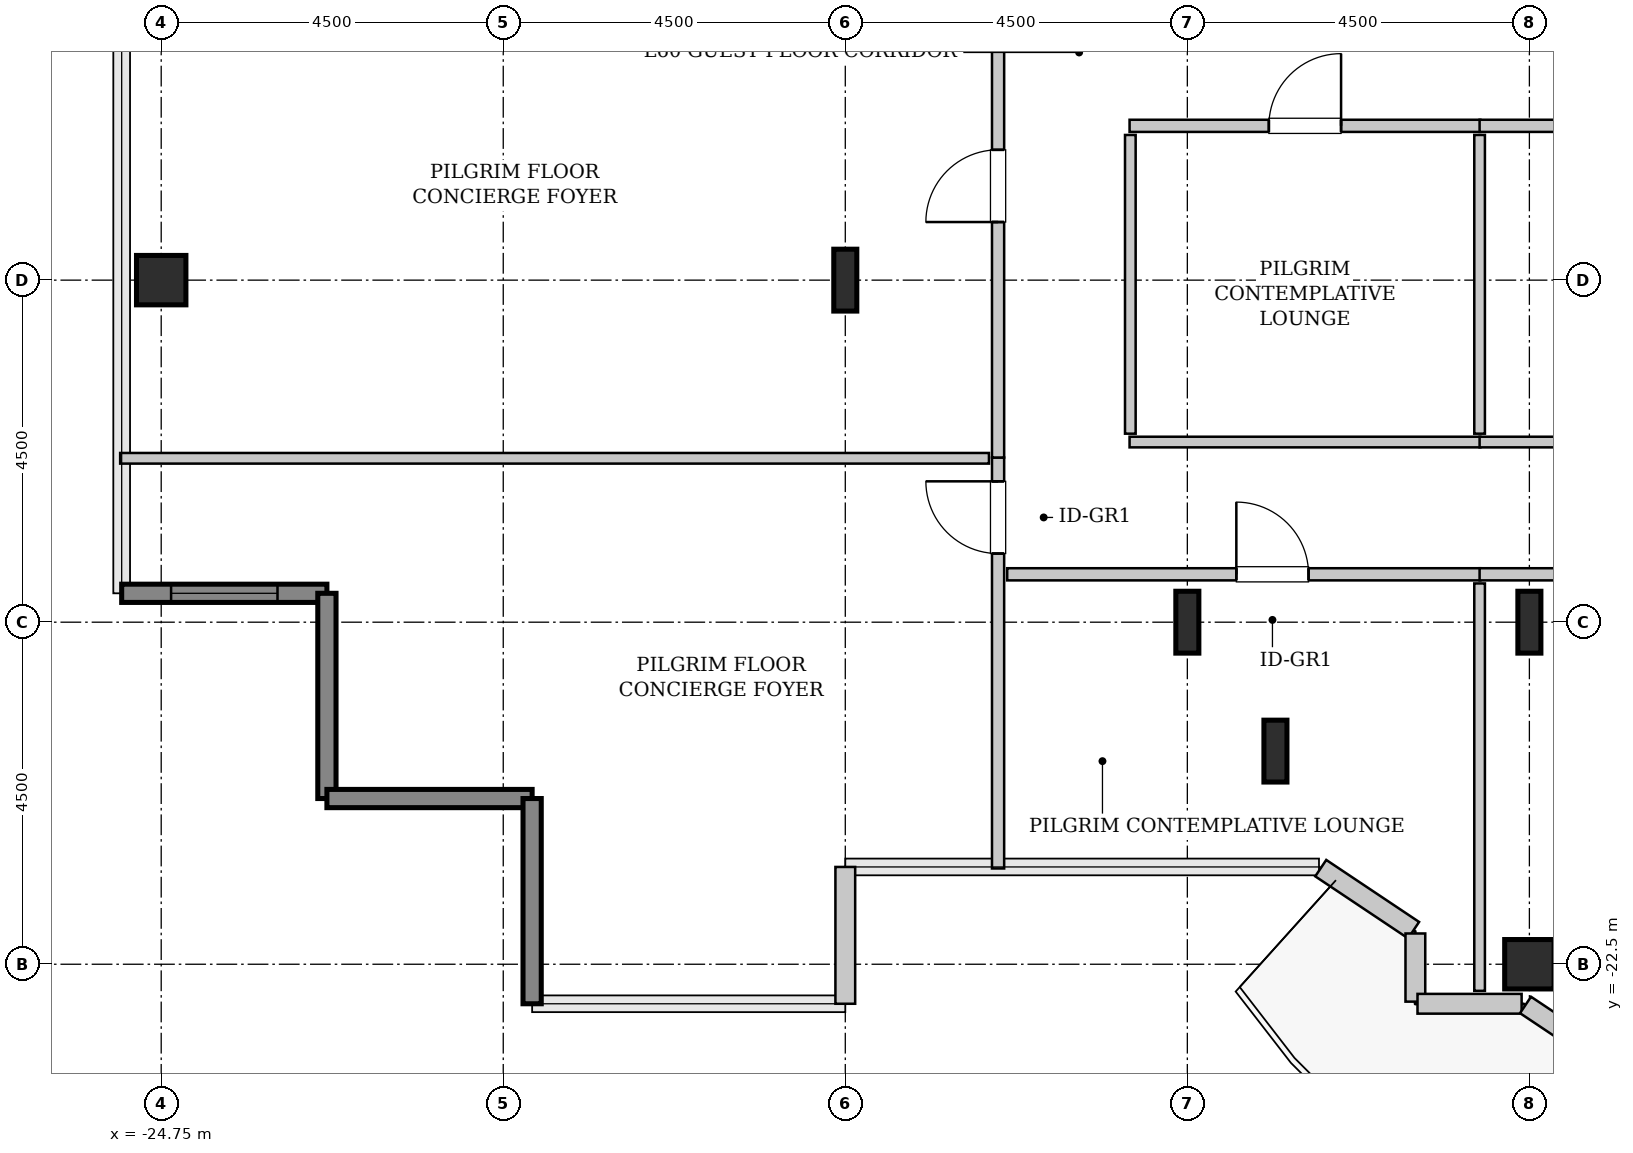
"""IFC4 building model, lengths in metres.
Left out: names, types, materials, properties, quantities, classifications, styles, units other than length and angle.
Written with IfcOpenShell. Run it as: python <this file> out.ifc"""

import sys

from ifc_helpers import new_model, si_unit, direction, frame, frame_2d, origin, origin_2d, place, context, subcontext, project, spatial, rectangle, hollow_rectangle, i_section, extrude, source, transform, mapped, element, fill, save


model = new_model("IFC4")
c1 = context("Model", 3, precision=1e-05, world=origin(), true_north=direction((0.0, 1.0)))
c2 = subcontext(c1, "Body", "Model", "MODEL_VIEW")
j1 = project(units=[si_unit("LENGTHUNIT", "METRE"), si_unit("PLANEANGLEUNIT", "RADIAN")], contexts=[c1])
p1 = place(None, origin())
s1 = spatial("IfcSite", under=j1, at=p1, CompositionType="ELEMENT")
p2 = place(p1, origin())
s2 = spatial("IfcBuilding", under=s1, at=p2, CompositionType="ELEMENT")
p3 = place(p2, frame((0.0, 0.0, 240.8)))
s3 = spatial("IfcBuildingStorey", under=s2, at=p3, CompositionType="ELEMENT", Elevation=240.8)
m1 = source(origin(), c2, "Body", "SweptSolid", [
    extrude(hollow_rectangle(XDim=0.65, YDim=0.65, WallThickness=0.032, InnerFilletRadius=0.032, OuterFilletRadius=0.064, at=origin_2d()), origin(), (0.0, 0.0, 1.0), 3.8),
])
p4 = place(p3, frame((-24.75, -13.5, 0.0), z_axis=(0.0, 0.0, 1.0), x_axis=(1.0, 0.0, 0.0)))
e1 = element("IfcColumn", 1, at=p4, inside=s3, PredefinedType="COLUMN", context=c2, shape_type="MappedRepresentation", body=[
    mapped(m1, transform((0.0, 0.0, 0.0), x_axis=(1.0, 0.0, 0.0), y_axis=(0.0, 1.0, 0.0), z_axis=(0.0, 0.0, 1.0), scale=1.0)),
])
m2 = source(origin(), c2, "Body", "SweptSolid", [
    extrude(i_section(OverallWidth=0.303, OverallDepth=0.814, WebThickness=0.021, FlangeThickness=0.04, FilletRadius=0.03, at=origin_2d()), origin(), (0.0, 0.0, 1.0), 3.8),
])
for number, where, z_axis, x_axis in (
    (2, (-15.75, -13.5, 0.0), (0.0, 0.0, 1.0), (1.0, 0.0, 0.0)),
    (3, (-11.25, -18.0, 0.0), (0.0, 0.0, 1.0), (1.0, 0.0, 0.0)),
    (4, (-10.091, -19.696, 0.0), (0.0, 0.0, 1.0), (1.0, 0.0, 0.0)),
):
    element("IfcColumn", number, at=place(p3, frame(where, z_axis=z_axis, x_axis=x_axis)), inside=s3, PredefinedType="COLUMN", context=c2, shape_type="MappedRepresentation", body=[
        mapped(m2, transform((0.0, 0.0, 0.0), x_axis=(1.0, 0.0, 0.0), y_axis=(0.0, 1.0, 0.0), z_axis=(0.0, 0.0, 1.0), scale=1.0)),
    ])
p5 = place(p3, frame((-6.75, -22.5, 0.0), z_axis=(0.0, 0.0, 1.0), x_axis=(1.0, 0.0, 0.0)))
e5 = element("IfcColumn", 5, at=p5, inside=s3, PredefinedType="COLUMN", context=c2, shape_type="MappedRepresentation", body=[
    mapped(m1, transform((0.0, 0.0, 0.0), x_axis=(1.0, 0.0, 0.0), y_axis=(0.0, 1.0, 0.0), z_axis=(0.0, 0.0, 1.0), scale=1.0)),
])
p6 = place(p3, frame((-6.75, -18.0, 0.0), z_axis=(0.0, 0.0, 1.0), x_axis=(1.0, 0.0, 0.0)))
e6 = element("IfcColumn", 6, at=p6, inside=s3, PredefinedType="COLUMN", context=c2, shape_type="MappedRepresentation", body=[
    mapped(m2, transform((0.0, 0.0, 0.0), x_axis=(1.0, 0.0, 0.0), y_axis=(0.0, 1.0, 0.0), z_axis=(0.0, 0.0, 1.0), scale=1.0)),
])
m3 = source(origin(), c2, "Body", "SweptSolid", [
    extrude(rectangle(XDim=2.7, YDim=0.24, at=frame_2d((1.35, 0.0))), origin(), (0.0, 0.0, 1.0), 3.55),
])
p7 = place(p3, frame((-25.27, -17.62, 0.0), z_axis=(0.0, 0.0, 1.0), x_axis=(1.0, 0.0, 0.0)))
e7 = element("IfcWall", 7, at=p7, inside=s3, PredefinedType="SHEAR", context=c2, shape_type="MappedRepresentation", body=[
    mapped(m3, transform((0.0, 0.0, 0.0), x_axis=(1.0, 0.0, 0.0), y_axis=(0.0, 1.0, 0.0), z_axis=(0.0, 0.0, 1.0), scale=1.0)),
])
p8 = place(p7, frame((0.65, 0.0, 0.85)))
e8 = element("IfcOpeningElement", 8, at=p8, cuts=e7, PredefinedType="OPENING", context=c2, shape_type="SweptSolid", body=[
    extrude(rectangle(XDim=1.4, YDim=1.8, at=frame_2d((0.7, 0.9))), frame((0.0, 0.13, 0.0), z_axis=(0.0, -1.0, 0.0), x_axis=(1.0, 0.0, 0.0)), (0.0, 0.0, 1.0), 0.26),
])
for number, where, z_axis, x_axis in (
    (9, (-22.57, -17.62, 0.0), (0.0, 0.0, 1.0), (0.0, -1.0, 0.0)),
    (10, (-22.57, -20.32, 0.0), (0.0, 0.0, 1.0), (1.0, 0.0, 0.0)),
    (11, (-19.87, -20.32, 0.0), (0.0, 0.0, 1.0), (0.0, -1.0, 0.0)),
):
    element("IfcWall", number, at=place(p3, frame(where, z_axis=z_axis, x_axis=x_axis)), inside=s3, PredefinedType="SHEAR", context=c2, shape_type="MappedRepresentation", body=[
        mapped(m3, transform((0.0, 0.0, 0.0), x_axis=(1.0, 0.0, 0.0), y_axis=(0.0, 1.0, 0.0), z_axis=(0.0, 0.0, 1.0), scale=1.0)),
    ])
m4 = source(origin(), c2, "Body", "SweptSolid", [
    extrude(rectangle(XDim=1.8, YDim=0.26, at=frame_2d((0.9, 0.0))), origin(), (0.0, 0.0, 1.0), 3.55),
])
p9 = place(p3, frame((-15.75, -23.02, 0.0), z_axis=(0.0, 0.0, 1.0), x_axis=(0.0, 1.0, 0.0)))
e12 = element("IfcWall", 12, at=p9, inside=s3, PredefinedType="SOLIDWALL", context=c2, shape_type="MappedRepresentation", body=[
    mapped(m4, transform((0.0, 0.0, 0.0), x_axis=(1.0, 0.0, 0.0), y_axis=(0.0, 1.0, 0.0), z_axis=(0.0, 0.0, 1.0), scale=1.0)),
])
m5 = source(origin(), c2, "Body", "SweptSolid", [
    extrude(rectangle(XDim=1.469, YDim=0.26, at=frame_2d((0.734, 0.0))), origin(), (0.0, 0.0, 1.0), 3.55),
])
p10 = place(p3, frame((-9.495, -21.236, 0.0), z_axis=(0.0, 0.0, 1.0), x_axis=(0.831461760506, -0.555581983884, 0.0)))
e13 = element("IfcWall", 13, at=p10, inside=s3, PredefinedType="SOLIDWALL", context=c2, shape_type="MappedRepresentation", body=[
    mapped(m5, transform((0.0, 0.0, 0.0), x_axis=(1.0, 0.0, 0.0), y_axis=(0.0, 1.0, 0.0), z_axis=(0.0, 0.0, 1.0), scale=1.0)),
])
m6 = source(origin(), c2, "Body", "SweptSolid", [
    extrude(rectangle(XDim=0.897, YDim=0.26, at=frame_2d((0.448, 0.0))), origin(), (0.0, 0.0, 1.0), 3.55),
])
p11 = place(p3, frame((-8.25, -22.095, 0.0), z_axis=(0.0, 0.0, 1.0), x_axis=(0.0, -1.0, 0.0)))
e14 = element("IfcWall", 14, at=p11, inside=s3, PredefinedType="SOLIDWALL", context=c2, shape_type="MappedRepresentation", body=[
    mapped(m6, transform((0.0, 0.0, 0.0), x_axis=(1.0, 0.0, 0.0), y_axis=(0.0, 1.0, 0.0), z_axis=(0.0, 0.0, 1.0), scale=1.0)),
])
m7 = source(origin(), c2, "Body", "SweptSolid", [
    extrude(rectangle(XDim=1.37, YDim=0.26, at=frame_2d((0.685, 0.0))), origin(), (0.0, 0.0, 1.0), 3.55),
])
p12 = place(p3, frame((-8.222, -23.02, 0.0), z_axis=(0.0, 0.0, 1.0), x_axis=(1.0, 0.0, 0.0)))
e15 = element("IfcWall", 15, at=p12, inside=s3, PredefinedType="SOLIDWALL", context=c2, shape_type="MappedRepresentation", body=[
    mapped(m7, transform((0.0, 0.0, 0.0), x_axis=(1.0, 0.0, 0.0), y_axis=(0.0, 1.0, 0.0), z_axis=(0.0, 0.0, 1.0), scale=1.0)),
])
m8 = source(origin(), c2, "Body", "SweptSolid", [
    extrude(rectangle(XDim=0.565, YDim=0.26, at=frame_2d((0.283, 0.0))), origin(), (0.0, 0.0, 1.0), 3.55),
])
p13 = place(p3, frame((-6.801, -23.036, 0.0), z_axis=(0.0, 0.0, 1.0), x_axis=(0.831651492666, -0.555297933317, 0.0)))
e16 = element("IfcWall", 16, at=p13, inside=s3, PredefinedType="SOLIDWALL", context=c2, shape_type="MappedRepresentation", body=[
    mapped(m8, transform((0.0, 0.0, 0.0), x_axis=(1.0, 0.0, 0.0), y_axis=(0.0, 1.0, 0.0), z_axis=(0.0, 0.0, 1.0), scale=1.0)),
])
m9 = source(origin(), c2, "Body", "SweptSolid", [
    extrude(rectangle(XDim=5.406, YDim=0.16, at=frame_2d((2.703, 0.0))), origin(), (0.0, 0.0, 1.0), 3.535),
])
p14 = place(p3, frame((-13.74, -21.24, 0.0), z_axis=(0.0, 0.0, 1.0), x_axis=(0.0, 1.0, 0.0)))
e17 = element("IfcWall", 17, at=p14, inside=s3, PredefinedType="PARTITIONING", context=c2, shape_type="MappedRepresentation", body=[
    mapped(m9, transform((0.0, 0.0, 0.0), x_axis=(1.0, 0.0, 0.0), y_axis=(0.0, 1.0, 0.0), z_axis=(0.0, 0.0, 1.0), scale=1.0)),
])
p15 = place(p14, frame((4.143, 0.0, 0.0)))
e18 = element("IfcOpeningElement", 18, at=p15, cuts=e17, PredefinedType="OPENING", context=c2, shape_type="SweptSolid", body=[
    extrude(rectangle(XDim=0.95, YDim=2.1, at=frame_2d((0.475, 1.05))), frame((0.0, 0.09, 0.0), z_axis=(0.0, -1.0, 0.0), x_axis=(1.0, 0.0, 0.0)), (0.0, 0.0, 1.0), 0.18),
])
m10 = source(origin(), c2, "Body", "SweptSolid", [
    extrude(rectangle(XDim=11.43, YDim=0.14, at=frame_2d((5.715, 0.0))), origin(), (0.0, 0.0, 1.0), 3.535),
])
p16 = place(p3, frame((-25.29, -15.844, 0.0), z_axis=(0.0, 0.0, 1.0), x_axis=(1.0, 0.0, 0.0)))
e19 = element("IfcWall", 19, at=p16, inside=s3, PredefinedType="PARTITIONING", context=c2, shape_type="MappedRepresentation", body=[
    mapped(m10, transform((0.0, 0.0, 0.0), x_axis=(1.0, 0.0, 0.0), y_axis=(0.0, 1.0, 0.0), z_axis=(0.0, 0.0, 1.0), scale=1.0)),
])
m11 = source(origin(), c2, "Body", "SweptSolid", [
    extrude(rectangle(XDim=7.146, YDim=0.16, at=frame_2d((3.573, 0.0))), origin(), (0.0, 0.0, 1.0), 3.535),
])
p17 = place(p3, frame((-13.74, -15.834, 0.0), z_axis=(0.0, 0.0, 1.0), x_axis=(0.0, 1.0, 0.0)))
e20 = element("IfcWall", 20, at=p17, inside=s3, PredefinedType="PARTITIONING", context=c2, shape_type="MappedRepresentation", body=[
    mapped(m11, transform((0.0, 0.0, 0.0), x_axis=(1.0, 0.0, 0.0), y_axis=(0.0, 1.0, 0.0), z_axis=(0.0, 0.0, 1.0), scale=1.0)),
])
p18 = place(p17, frame((3.098, 0.0, 0.0)))
e21 = element("IfcOpeningElement", 21, at=p18, cuts=e20, PredefinedType="OPENING", context=c2, shape_type="SweptSolid", body=[
    extrude(rectangle(XDim=0.95, YDim=2.1, at=frame_2d((0.475, 1.05))), frame((0.0, 0.09, 0.0), z_axis=(0.0, -1.0, 0.0), x_axis=(1.0, 0.0, 0.0)), (0.0, 0.0, 1.0), 0.18),
])
m12 = source(origin(), c2, "Body", "SweptSolid", [
    extrude(rectangle(XDim=6.225, YDim=0.16, at=frame_2d((3.113, 0.0))), origin(), (0.0, 0.0, 1.0), 3.535),
])
p19 = place(p3, frame((-13.62, -17.37, 0.0), z_axis=(0.0, 0.0, 1.0), x_axis=(1.0, 0.0, 0.0)))
e22 = element("IfcWall", 22, at=p19, inside=s3, PredefinedType="PARTITIONING", context=c2, shape_type="MappedRepresentation", body=[
    mapped(m12, transform((0.0, 0.0, 0.0), x_axis=(1.0, 0.0, 0.0), y_axis=(0.0, 1.0, 0.0), z_axis=(0.0, 0.0, 1.0), scale=1.0)),
])
p20 = place(p19, frame((3.015, 0.0, 0.0)))
e23 = element("IfcOpeningElement", 23, at=p20, cuts=e22, PredefinedType="OPENING", context=c2, shape_type="SweptSolid", body=[
    extrude(rectangle(XDim=0.95, YDim=2.1, at=frame_2d((0.475, 1.05))), frame((0.0, 0.09, 0.0), z_axis=(0.0, -1.0, 0.0), x_axis=(1.0, 0.0, 0.0)), (0.0, 0.0, 1.0), 0.18),
])
m13 = source(origin(), c2, "Body", "SweptSolid", [
    extrude(rectangle(XDim=5.36, YDim=0.14, at=frame_2d((2.68, 0.0))), origin(), (0.0, 0.0, 1.0), 3.535),
])
p21 = place(p3, frame((-7.405, -22.85, 0.0), z_axis=(0.0, 0.0, 1.0), x_axis=(0.0, 1.0, 0.0)))
e24 = element("IfcWall", 24, at=p21, inside=s3, PredefinedType="PARTITIONING", context=c2, shape_type="MappedRepresentation", body=[
    mapped(m13, transform((0.0, 0.0, 0.0), x_axis=(1.0, 0.0, 0.0), y_axis=(0.0, 1.0, 0.0), z_axis=(0.0, 0.0, 1.0), scale=1.0)),
])
m14 = source(origin(), c2, "Body", "SweptSolid", [
    extrude(rectangle(XDim=4.615, YDim=0.16, at=frame_2d((2.308, 0.0))), origin(), (0.0, 0.0, 1.0), 3.535),
])
p22 = place(p3, frame((-12.01, -11.47, 0.0), z_axis=(0.0, 0.0, 1.0), x_axis=(1.0, 0.0, 0.0)))
e25 = element("IfcWall", 25, at=p22, inside=s3, PredefinedType="PARTITIONING", context=c2, shape_type="MappedRepresentation", body=[
    mapped(m14, transform((0.0, 0.0, 0.0), x_axis=(1.0, 0.0, 0.0), y_axis=(0.0, 1.0, 0.0), z_axis=(0.0, 0.0, 1.0), scale=1.0)),
])
p23 = place(p22, frame((1.833, 0.0, 0.0)))
e26 = element("IfcOpeningElement", 26, at=p23, cuts=e25, PredefinedType="OPENING", context=c2, shape_type="SweptSolid", body=[
    extrude(rectangle(XDim=0.95, YDim=2.1, at=frame_2d((0.475, 1.05))), frame((0.0, 0.09, 0.0), z_axis=(0.0, -1.0, 0.0), x_axis=(1.0, 0.0, 0.0)), (0.0, 0.0, 1.0), 0.18),
])
m15 = source(origin(), c2, "Body", "SweptSolid", [
    extrude(rectangle(XDim=4.615, YDim=0.14, at=frame_2d((2.308, 0.0))), origin(), (0.0, 0.0, 1.0), 3.535),
])
p24 = place(p3, frame((-12.01, -15.63, 0.0), z_axis=(0.0, 0.0, 1.0), x_axis=(1.0, 0.0, 0.0)))
e27 = element("IfcWall", 27, at=p24, inside=s3, PredefinedType="PARTITIONING", context=c2, shape_type="MappedRepresentation", body=[
    mapped(m15, transform((0.0, 0.0, 0.0), x_axis=(1.0, 0.0, 0.0), y_axis=(0.0, 1.0, 0.0), z_axis=(0.0, 0.0, 1.0), scale=1.0)),
])
m16 = source(origin(), c2, "Body", "SweptSolid", [
    extrude(rectangle(XDim=3.93, YDim=0.14, at=frame_2d((1.965, 0.0))), origin(), (0.0, 0.0, 1.0), 3.535),
])
for number, where, z_axis, x_axis in (
    (28, (-12.0, -15.52, 0.0), (0.0, 0.0, 1.0), (0.0, 1.0, 0.0)),
    (29, (-7.405, -15.52, 0.0), (0.0, 0.0, 1.0), (0.0, 1.0, 0.0)),
):
    element("IfcWall", number, at=place(p3, frame(where, z_axis=z_axis, x_axis=x_axis)), inside=s3, PredefinedType="PARTITIONING", context=c2, shape_type="MappedRepresentation", body=[
        mapped(m16, transform((0.0, 0.0, 0.0), x_axis=(1.0, 0.0, 0.0), y_axis=(0.0, 1.0, 0.0), z_axis=(0.0, 0.0, 1.0), scale=1.0)),
    ])
m17 = source(origin(), c2, "Body", "SweptSolid", [
    extrude(rectangle(XDim=12.21, YDim=0.16, at=frame_2d((6.105, 0.0))), origin(), (0.0, 0.0, 1.0), 3.535),
])
p25 = place(p3, frame((-7.405, -17.37, 0.0), z_axis=(0.0, 0.0, 1.0), x_axis=(1.0, 0.0, 0.0)))
e30 = element("IfcWall", 30, at=p25, inside=s3, PredefinedType="PARTITIONING", context=c2, shape_type="MappedRepresentation", body=[
    mapped(m17, transform((0.0, 0.0, 0.0), x_axis=(1.0, 0.0, 0.0), y_axis=(0.0, 1.0, 0.0), z_axis=(0.0, 0.0, 1.0), scale=1.0)),
])
p26 = place(p25, frame((5.63, 0.0, 0.0)))
e31 = element("IfcOpeningElement", 31, at=p26, cuts=e30, PredefinedType="OPENING", context=c2, shape_type="SweptSolid", body=[
    extrude(rectangle(XDim=0.95, YDim=2.1, at=frame_2d((0.475, 1.05))), frame((0.0, 0.09, 0.0), z_axis=(0.0, -1.0, 0.0), x_axis=(1.0, 0.0, 0.0)), (0.0, 0.0, 1.0), 0.18),
])
p27 = place(p3, frame((-7.405, -11.47, 0.0), z_axis=(0.0, 0.0, 1.0), x_axis=(1.0, 0.0, 0.0)))
e32 = element("IfcWall", 32, at=p27, inside=s3, PredefinedType="PARTITIONING", context=c2, shape_type="MappedRepresentation", body=[
    mapped(m17, transform((0.0, 0.0, 0.0), x_axis=(1.0, 0.0, 0.0), y_axis=(0.0, 1.0, 0.0), z_axis=(0.0, 0.0, 1.0), scale=1.0)),
])
p28 = place(p27, frame((5.63, 0.0, 0.0)))
e33 = element("IfcOpeningElement", 33, at=p28, cuts=e32, PredefinedType="OPENING", context=c2, shape_type="SweptSolid", body=[
    extrude(rectangle(XDim=0.95, YDim=2.1, at=frame_2d((0.475, 1.05))), frame((0.0, 0.09, 0.0), z_axis=(0.0, -1.0, 0.0), x_axis=(1.0, 0.0, 0.0)), (0.0, 0.0, 1.0), 0.18),
])
m18 = source(origin(), c2, "Body", "SweptSolid", [
    extrude(rectangle(XDim=12.21, YDim=0.14, at=frame_2d((6.105, 0.0))), origin(), (0.0, 0.0, 1.0), 3.535),
])
p29 = place(p3, frame((-7.405, -15.63, 0.0), z_axis=(0.0, 0.0, 1.0), x_axis=(1.0, 0.0, 0.0)))
e34 = element("IfcWall", 34, at=p29, inside=s3, PredefinedType="PARTITIONING", context=c2, shape_type="MappedRepresentation", body=[
    mapped(m18, transform((0.0, 0.0, 0.0), x_axis=(1.0, 0.0, 0.0), y_axis=(0.0, 1.0, 0.0), z_axis=(0.0, 0.0, 1.0), scale=1.0)),
])
m19 = source(origin(), c2, "Body", "SweptSolid", [
    extrude(rectangle(XDim=1.4, YDim=1.8, at=frame_2d((0.7, 0.9))), frame((0.0, 0.03, 0.0), z_axis=(0.0, -1.0, 0.0), x_axis=(1.0, 0.0, 0.0)), (0.0, 0.0, 1.0), 0.06),
])
p30 = place(p8, origin())
e35 = element("IfcWindow", 35, at=p30, inside=s3, PartitioningType="SINGLE_PANEL", PredefinedType="WINDOW", context=c2, shape_type="MappedRepresentation", body=[
    mapped(m19, transform((0.0, 0.0, 0.0), x_axis=(1.0, 0.0, 0.0), y_axis=(0.0, 1.0, 0.0), z_axis=(0.0, 0.0, 1.0), scale=1.0)),
])
fill(e8, e35)
m20 = source(origin(), c2, "Body", "SweptSolid", [
    extrude(rectangle(XDim=0.95, YDim=2.1, at=frame_2d((0.475, 1.05))), frame((0.0, 0.025, 0.0), z_axis=(0.0, -1.0, 0.0), x_axis=(1.0, 0.0, 0.0)), (0.0, 0.0, 1.0), 0.05),
])
p31 = place(p15, origin())
e36 = element("IfcDoor", 36, at=p31, inside=s3, OperationType="SINGLE_SWING_RIGHT", PredefinedType="DOOR", context=c2, shape_type="MappedRepresentation", body=[
    mapped(m20, transform((0.0, 0.0, 0.0), x_axis=(1.0, 0.0, 0.0), y_axis=(0.0, 1.0, 0.0), z_axis=(0.0, 0.0, 1.0), scale=1.0)),
])
fill(e18, e36)
p32 = place(p18, origin())
e37 = element("IfcDoor", 37, at=p32, inside=s3, OperationType="SINGLE_SWING_LEFT", PredefinedType="DOOR", context=c2, shape_type="MappedRepresentation", body=[
    mapped(m20, transform((0.0, 0.0, 0.0), x_axis=(1.0, 0.0, 0.0), y_axis=(0.0, 1.0, 0.0), z_axis=(0.0, 0.0, 1.0), scale=1.0)),
])
fill(e21, e37)
p33 = place(p20, origin())
e38 = element("IfcDoor", 38, at=p33, inside=s3, OperationType="SINGLE_SWING_LEFT", PredefinedType="DOOR", context=c2, shape_type="MappedRepresentation", body=[
    mapped(m20, transform((0.0, 0.0, 0.0), x_axis=(1.0, 0.0, 0.0), y_axis=(0.0, 1.0, 0.0), z_axis=(0.0, 0.0, 1.0), scale=1.0)),
])
fill(e23, e38)
p34 = place(p23, origin())
e39 = element("IfcDoor", 39, at=p34, inside=s3, OperationType="SINGLE_SWING_RIGHT", PredefinedType="DOOR", context=c2, shape_type="MappedRepresentation", body=[
    mapped(m20, transform((0.0, 0.0, 0.0), x_axis=(1.0, 0.0, 0.0), y_axis=(0.0, 1.0, 0.0), z_axis=(0.0, 0.0, 1.0), scale=1.0)),
])
fill(e26, e39)
save(model, sys.argv[1])
